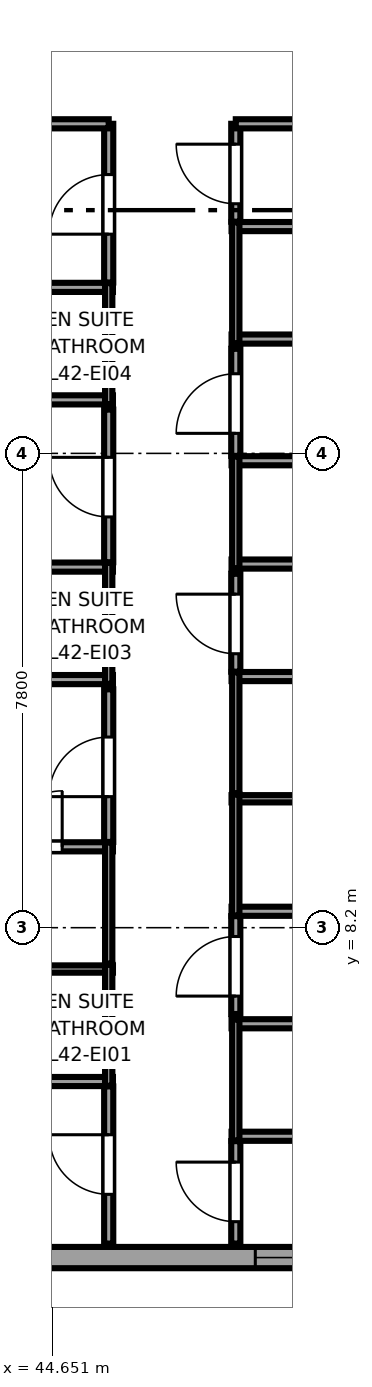
"""IFC4 building model, lengths in metres.
Left out: names, types, materials, properties, quantities, classifications, styles, units other than length and angle.
Written with IfcOpenShell. Run it as: python <this file> out.ifc"""

import sys

from ifc_helpers import new_model, si_unit, direction, frame, frame_2d, origin, place, context, subcontext, project, spatial, rectangle, extrude, source, transform, mapped, element, fill, save


model = new_model("IFC4")
c1 = context("Model", 3, precision=1e-05, world=origin(), true_north=direction((0.0, 1.0)))
c2 = subcontext(c1, "Body", "Model", "MODEL_VIEW")
j1 = project(units=[si_unit("LENGTHUNIT", "METRE"), si_unit("PLANEANGLEUNIT", "RADIAN")], contexts=[c1])
p1 = place(None, origin())
s1 = spatial("IfcSite", under=j1, at=p1, CompositionType="ELEMENT")
p2 = place(p1, origin())
s2 = spatial("IfcBuilding", under=s1, at=p2, CompositionType="ELEMENT")
p3 = place(p2, frame((0.0, 0.0, 161.25)))
s3 = spatial("IfcBuildingStorey", under=s2, at=p3, CompositionType="ELEMENT", Elevation=161.25)
p4 = place(p3, frame((34.375, 2.775, 0.0), z_axis=(0.0, 0.0, 1.0), x_axis=(1.0, 0.0, 0.0)))
e1 = element("IfcWall", 1, at=p4, inside=s3, PredefinedType="SOLIDWALL", context=c2, shape_type="SweptSolid", body=[
    extrude(rectangle(XDim=15.608, YDim=0.35, at=frame_2d((7.804, 0.0))), origin(), (0.0, 0.0, 1.0), 3.37),
])
p5 = place(p4, frame((1.726, 0.0, 0.68)))
e2 = element("IfcOpeningElement", 2, at=p5, cuts=e1, PredefinedType="OPENING", context=c2, shape_type="SweptSolid", body=[
    extrude(rectangle(XDim=2.55, YDim=1.92, at=frame_2d((1.275, 0.96))), frame((0.0, 0.185, 0.0), z_axis=(0.0, -1.0, 0.0), x_axis=(1.0, 0.0, 0.0)), (0.0, 0.0, 1.0), 0.37),
])
p6 = place(p4, frame((13.616, 0.0, 0.62)))
e3 = element("IfcOpeningElement", 3, at=p6, cuts=e1, PredefinedType="OPENING", context=c2, shape_type="SweptSolid", body=[
    extrude(rectangle(XDim=1.5, YDim=1.55, at=frame_2d((0.75, 0.775))), frame((0.0, 0.185, 0.0), z_axis=(0.0, -1.0, 0.0), x_axis=(1.0, 0.0, 0.0)), (0.0, 0.0, 1.0), 0.37),
])
p7 = place(p3, frame((43.06, 5.67, 0.0), z_axis=(0.0, 0.0, 1.0), x_axis=(1.0, 0.0, 0.0)))
e4 = element("IfcWall", 4, at=p7, inside=s3, PredefinedType="PARTITIONING", context=c2, shape_type="SweptSolid", body=[
    extrude(rectangle(XDim=2.59, YDim=0.15, at=frame_2d((1.295, 0.0))), origin(), (0.0, 0.0, 1.0), 3.37),
])
p8 = place(p3, frame((43.06, 7.52, 0.0), z_axis=(0.0, 0.0, 1.0), x_axis=(1.0, 0.0, 0.0)))
e5 = element("IfcWall", 5, at=p8, inside=s3, PredefinedType="PLUMBINGWALL", context=c2, shape_type="SweptSolid", body=[
    extrude(rectangle(XDim=2.59, YDim=0.12, at=frame_2d((1.295, 0.0))), origin(), (0.0, 0.0, 1.0), 3.37),
])
p9 = place(p3, frame((45.58, 5.6, 0.0), z_axis=(0.0, 0.0, 1.0), x_axis=(0.0, 1.0, 0.0)))
e6 = element("IfcWall", 6, at=p9, inside=s3, PredefinedType="PLUMBINGWALL", context=c2, shape_type="SweptSolid", body=[
    extrude(rectangle(XDim=1.99, YDim=0.12, at=frame_2d((0.995, 0.0))), origin(), (0.0, 0.0, 1.0), 3.37),
])
p10 = place(p3, frame((43.06, 9.53, 0.0), z_axis=(0.0, 0.0, 1.0), x_axis=(1.0, 0.0, 0.0)))
e7 = element("IfcWall", 7, at=p10, inside=s3, PredefinedType="PARTITIONING", context=c2, shape_type="SweptSolid", body=[
    extrude(rectangle(XDim=2.59, YDim=0.15, at=frame_2d((1.295, 0.0))), origin(), (0.0, 0.0, 1.0), 3.37),
])
p11 = place(p10, frame((0.835, 0.0, 0.0)))
e8 = element("IfcOpeningElement", 8, at=p11, cuts=e7, PredefinedType="OPENING", context=c2, shape_type="SweptSolid", body=[
    extrude(rectangle(XDim=0.92, YDim=2.01, at=frame_2d((0.46, 1.005))), frame((0.0, 0.085, 0.0), z_axis=(0.0, -1.0, 0.0), x_axis=(1.0, 0.0, 0.0)), (0.0, 0.0, 1.0), 0.17),
])
p12 = place(p3, frame((45.58, 7.61, 0.0), z_axis=(0.0, 0.0, 1.0), x_axis=(0.0, 1.0, 0.0)))
e9 = element("IfcWall", 9, at=p12, inside=s3, PredefinedType="PLUMBINGWALL", context=c2, shape_type="SweptSolid", body=[
    extrude(rectangle(XDim=1.99, YDim=0.12, at=frame_2d((0.995, 0.0))), origin(), (0.0, 0.0, 1.0), 3.001),
])
p13 = place(p3, frame((34.65, 12.28, 0.0), z_axis=(0.0, 0.0, 1.0), x_axis=(1.0, 0.0, 0.0)))
e10 = element("IfcWall", 10, at=p13, inside=s3, PredefinedType="PARTITIONING", context=c2, shape_type="SweptSolid", body=[
    extrude(rectangle(XDim=11.0, YDim=0.15, at=frame_2d((5.5, 0.0))), origin(), (0.0, 0.0, 1.0), 3.37),
])
p14 = place(p3, frame((43.06, 14.13, 0.0), z_axis=(0.0, 0.0, 1.0), x_axis=(1.0, 0.0, 0.0)))
e11 = element("IfcWall", 11, at=p14, inside=s3, PredefinedType="PARTITIONING", context=c2, shape_type="SweptSolid", body=[
    extrude(rectangle(XDim=2.59, YDim=0.15, at=frame_2d((1.295, 0.0))), origin(), (0.0, 0.0, 1.0), 3.37),
])
p15 = place(p3, frame((45.58, 12.21, 0.0), z_axis=(0.0, 0.0, 1.0), x_axis=(0.0, 1.0, 0.0)))
e12 = element("IfcWall", 12, at=p15, inside=s3, PredefinedType="PLUMBINGWALL", context=c2, shape_type="SweptSolid", body=[
    extrude(rectangle(XDim=1.99, YDim=0.12, at=frame_2d((0.995, 0.0))), origin(), (0.0, 0.0, 1.0), 3.001),
])
p16 = place(p3, frame((34.65, 16.88, 0.0), z_axis=(0.0, 0.0, 1.0), x_axis=(1.0, 0.0, 0.0)))
e13 = element("IfcWall", 13, at=p16, inside=s3, PredefinedType="PARTITIONING", context=c2, shape_type="SweptSolid", body=[
    extrude(rectangle(XDim=11.0, YDim=0.15, at=frame_2d((5.5, 0.0))), origin(), (0.0, 0.0, 1.0), 3.37),
])
p17 = place(p3, frame((43.06, 18.73, 0.0), z_axis=(0.0, 0.0, 1.0), x_axis=(1.0, 0.0, 0.0)))
e14 = element("IfcWall", 14, at=p17, inside=s3, PredefinedType="PARTITIONING", context=c2, shape_type="SweptSolid", body=[
    extrude(rectangle(XDim=2.59, YDim=0.15, at=frame_2d((1.295, 0.0))), origin(), (0.0, 0.0, 1.0), 3.37),
])
p18 = place(p3, frame((45.58, 16.81, 0.0), z_axis=(0.0, 0.0, 1.0), x_axis=(0.0, 1.0, 0.0)))
e15 = element("IfcWall", 15, at=p18, inside=s3, PredefinedType="PLUMBINGWALL", context=c2, shape_type="SweptSolid", body=[
    extrude(rectangle(XDim=1.99, YDim=0.12, at=frame_2d((0.995, 0.0))), origin(), (0.0, 0.0, 1.0), 3.001),
])
p19 = place(p3, frame((47.6, 4.77, 0.0), z_axis=(0.0, 0.0, 1.0), x_axis=(1.0, 0.0, 0.0)))
e16 = element("IfcWall", 16, at=p19, inside=s3, PredefinedType="PARTITIONING", context=c2, shape_type="SweptSolid", body=[
    extrude(rectangle(XDim=2.455, YDim=0.15, at=frame_2d((1.228, 0.0))), origin(), (0.0, 0.0, 1.0), 2.832),
])
p20 = place(p3, frame((47.6, 6.62, 0.0), z_axis=(0.0, 0.0, 1.0), x_axis=(1.0, 0.0, 0.0)))
e17 = element("IfcWall", 17, at=p20, inside=s3, PredefinedType="PARTITIONING", context=c2, shape_type="SweptSolid", body=[
    extrude(rectangle(XDim=2.455, YDim=0.15, at=frame_2d((1.228, 0.0))), origin(), (0.0, 0.0, 1.0), 3.37),
])
p21 = place(p3, frame((47.67, 4.7, 0.0), z_axis=(0.0, 0.0, 1.0), x_axis=(0.0, 1.0, 0.0)))
e18 = element("IfcWall", 18, at=p21, inside=s3, PredefinedType="PLUMBINGWALL", context=c2, shape_type="SweptSolid", body=[
    extrude(rectangle(XDim=1.99, YDim=0.12, at=frame_2d((0.995, 0.0))), origin(), (0.0, 0.0, 1.0), 3.37),
])
p22 = place(p3, frame((47.6, 8.47, 0.0), z_axis=(0.0, 0.0, 1.0), x_axis=(1.0, 0.0, 0.0)))
e19 = element("IfcWall", 19, at=p22, inside=s3, PredefinedType="PARTITIONING", context=c2, shape_type="SweptSolid", body=[
    extrude(rectangle(XDim=2.455, YDim=0.15, at=frame_2d((1.228, 0.0))), origin(), (0.0, 0.0, 1.0), 3.37),
])
p23 = place(p3, frame((47.6, 10.32, 0.0), z_axis=(0.0, 0.0, 1.0), x_axis=(1.0, 0.0, 0.0)))
e20 = element("IfcWall", 20, at=p23, inside=s3, PredefinedType="PLUMBINGWALL", context=c2, shape_type="SweptSolid", body=[
    extrude(rectangle(XDim=2.455, YDim=0.12, at=frame_2d((1.228, 0.0))), origin(), (0.0, 0.0, 1.0), 3.37),
])
p24 = place(p3, frame((47.67, 8.4, 0.0), z_axis=(0.0, 0.0, 1.0), x_axis=(0.0, 1.0, 0.0)))
e21 = element("IfcWall", 21, at=p24, inside=s3, PredefinedType="PLUMBINGWALL", context=c2, shape_type="SweptSolid", body=[
    extrude(rectangle(XDim=1.99, YDim=0.12, at=frame_2d((0.995, 0.0))), origin(), (0.0, 0.0, 1.0), 3.37),
])
p25 = place(p3, frame((47.6, 12.33, 0.0), z_axis=(0.0, 0.0, 1.0), x_axis=(1.0, 0.0, 0.0)))
e22 = element("IfcWall", 22, at=p25, inside=s3, PredefinedType="PARTITIONING", context=c2, shape_type="SweptSolid", body=[
    extrude(rectangle(XDim=2.455, YDim=0.15, at=frame_2d((1.228, 0.0))), origin(), (0.0, 0.0, 1.0), 3.37),
])
p26 = place(p3, frame((47.67, 10.41, 0.0), z_axis=(0.0, 0.0, 1.0), x_axis=(0.0, 1.0, 0.0)))
e23 = element("IfcWall", 23, at=p26, inside=s3, PredefinedType="PLUMBINGWALL", context=c2, shape_type="SweptSolid", body=[
    extrude(rectangle(XDim=1.99, YDim=0.12, at=frame_2d((0.995, 0.0))), origin(), (0.0, 0.0, 1.0), 3.37),
])
p27 = place(p3, frame((47.6, 14.18, 0.0), z_axis=(0.0, 0.0, 1.0), x_axis=(1.0, 0.0, 0.0)))
e24 = element("IfcWall", 24, at=p27, inside=s3, PredefinedType="PARTITIONING", context=c2, shape_type="SweptSolid", body=[
    extrude(rectangle(XDim=6.395, YDim=0.15, at=frame_2d((3.198, 0.0))), origin(), (0.0, 0.0, 1.0), 3.37),
])
p28 = place(p3, frame((47.6, 15.879, 0.0), z_axis=(0.0, 0.0, 1.0), x_axis=(1.0, 0.0, 0.0)))
e25 = element("IfcWall", 25, at=p28, inside=s3, PredefinedType="PARTITIONING", context=c2, shape_type="SweptSolid", body=[
    extrude(rectangle(XDim=3.226, YDim=0.15, at=frame_2d((1.613, 0.0))), origin(), (0.0, 0.0, 1.0), 2.758),
])
p29 = place(p3, frame((47.67, 14.11, 0.0), z_axis=(0.0, 0.0, 1.0), x_axis=(0.0, 1.0, 0.0)))
e26 = element("IfcWall", 26, at=p29, inside=s3, PredefinedType="PLUMBINGWALL", context=c2, shape_type="SweptSolid", body=[
    extrude(rectangle(XDim=1.839, YDim=0.12, at=frame_2d((0.919, 0.0))), origin(), (0.0, 0.0, 1.0), 3.37),
])
p30 = place(p3, frame((47.6, 17.88, 0.0), z_axis=(0.0, 0.0, 1.0), x_axis=(1.0, 0.0, 0.0)))
e27 = element("IfcWall", 27, at=p30, inside=s3, PredefinedType="PARTITIONING", context=c2, shape_type="SweptSolid", body=[
    extrude(rectangle(XDim=6.395, YDim=0.15, at=frame_2d((3.198, 0.0))), origin(), (0.0, 0.0, 1.0), 3.37),
])
p31 = place(p3, frame((47.6, 19.73, 0.0), z_axis=(0.0, 0.0, 1.0), x_axis=(1.0, 0.0, 0.0)))
e28 = element("IfcWall", 28, at=p31, inside=s3, PredefinedType="PARTITIONING", context=c2, shape_type="SweptSolid", body=[
    extrude(rectangle(XDim=2.455, YDim=0.15, at=frame_2d((1.228, 0.0))), origin(), (0.0, 0.0, 1.0), 3.37),
])
p32 = place(p3, frame((47.67, 17.81, 0.0), z_axis=(0.0, 0.0, 1.0), x_axis=(0.0, 1.0, 0.0)))
e29 = element("IfcWall", 29, at=p32, inside=s3, PredefinedType="PLUMBINGWALL", context=c2, shape_type="SweptSolid", body=[
    extrude(rectangle(XDim=1.99, YDim=0.12, at=frame_2d((0.995, 0.0))), origin(), (0.0, 0.0, 1.0), 3.37),
])
p33 = place(p3, frame((45.58, 3.005, 0.0), z_axis=(0.0, 0.0, 1.0), x_axis=(0.0, 1.0, 0.0)))
e30 = element("IfcWall", 30, at=p33, inside=s3, PredefinedType="PARTITIONING", context=c2, shape_type="SweptSolid", body=[
    extrude(rectangle(XDim=2.585, YDim=0.15, at=frame_2d((1.292, 0.0))), origin(), (0.0, 0.0, 1.0), 3.37),
])
p34 = place(p33, frame((0.81, 0.0, 0.0)))
e31 = element("IfcOpeningElement", 31, at=p34, cuts=e30, PredefinedType="OPENING", context=c2, shape_type="SweptSolid", body=[
    extrude(rectangle(XDim=0.98, YDim=2.12, at=frame_2d((0.49, 1.06))), frame((0.0, 0.085, 0.0), z_axis=(0.0, -1.0, 0.0), x_axis=(1.0, 0.0, 0.0)), (0.0, 0.0, 1.0), 0.17),
])
p35 = place(p3, frame((45.58, 9.61, 0.0), z_axis=(0.0, 0.0, 1.0), x_axis=(0.0, 1.0, 0.0)))
e32 = element("IfcWall", 32, at=p35, inside=s3, PredefinedType="PARTITIONING", context=c2, shape_type="SweptSolid", body=[
    extrude(rectangle(XDim=2.51, YDim=0.15, at=frame_2d((1.255, 0.0))), origin(), (0.0, 0.0, 1.0), 3.001),
])
p36 = place(p35, frame((0.745, 0.0, 0.0)))
e33 = element("IfcOpeningElement", 33, at=p36, cuts=e32, PredefinedType="OPENING", context=c2, shape_type="SweptSolid", body=[
    extrude(rectangle(XDim=0.98, YDim=2.12, at=frame_2d((0.49, 1.06))), frame((0.0, 0.085, 0.0), z_axis=(0.0, -1.0, 0.0), x_axis=(1.0, 0.0, 0.0)), (0.0, 0.0, 1.0), 0.17),
])
p37 = place(p3, frame((45.58, 14.21, 0.0), z_axis=(0.0, 0.0, 1.0), x_axis=(0.0, 1.0, 0.0)))
e34 = element("IfcWall", 34, at=p37, inside=s3, PredefinedType="PARTITIONING", context=c2, shape_type="SweptSolid", body=[
    extrude(rectangle(XDim=2.51, YDim=0.15, at=frame_2d((1.255, 0.0))), origin(), (0.0, 0.0, 1.0), 3.001),
])
p38 = place(p37, frame((0.745, 0.0, 0.0)))
e35 = element("IfcOpeningElement", 35, at=p38, cuts=e34, PredefinedType="OPENING", context=c2, shape_type="SweptSolid", body=[
    extrude(rectangle(XDim=0.98, YDim=2.12, at=frame_2d((0.49, 1.06))), frame((0.0, 0.085, 0.0), z_axis=(0.0, -1.0, 0.0), x_axis=(1.0, 0.0, 0.0)), (0.0, 0.0, 1.0), 0.17),
])
p39 = place(p3, frame((45.58, 18.81, 0.0), z_axis=(0.0, 0.0, 1.0), x_axis=(0.0, 1.0, 0.0)))
e36 = element("IfcWall", 36, at=p39, inside=s3, PredefinedType="PARTITIONING", context=c2, shape_type="SweptSolid", body=[
    extrude(rectangle(XDim=2.61, YDim=0.15, at=frame_2d((1.305, 0.0))), origin(), (0.0, 0.0, 1.0), 3.001),
])
p40 = place(p39, frame((0.795, 0.0, 0.0)))
e37 = element("IfcOpeningElement", 37, at=p40, cuts=e36, PredefinedType="OPENING", context=c2, shape_type="SweptSolid", body=[
    extrude(rectangle(XDim=0.98, YDim=2.12, at=frame_2d((0.49, 1.06))), frame((0.0, 0.085, 0.0), z_axis=(0.0, -1.0, 0.0), x_axis=(1.0, 0.0, 0.0)), (0.0, 0.0, 1.0), 0.17),
])
p41 = place(p3, frame((34.65, 21.42, 0.0), z_axis=(0.0, 0.0, 1.0), x_axis=(1.0, 0.0, 0.0)))
e38 = element("IfcWall", 38, at=p41, inside=s3, PredefinedType="PARTITIONING", context=c2, shape_type="SweptSolid", body=[
    extrude(rectangle(XDim=10.93, YDim=0.15, at=frame_2d((5.465, 0.0))), origin(), (0.0, 0.0, 1.0), 3.37),
])
p42 = place(p3, frame((47.67, 3.005, 0.0), z_axis=(0.0, 0.0, 1.0), x_axis=(0.0, 1.0, 0.0)))
e39 = element("IfcWall", 39, at=p42, inside=s3, PredefinedType="PARTITIONING", context=c2, shape_type="SweptSolid", body=[
    extrude(rectangle(XDim=1.685, YDim=0.15, at=frame_2d((0.843, 0.0))), origin(), (0.0, 0.0, 1.0), 3.37),
])
p43 = place(p42, frame((0.36, 0.0, 0.0)))
e40 = element("IfcOpeningElement", 40, at=p43, cuts=e39, PredefinedType="OPENING", context=c2, shape_type="SweptSolid", body=[
    extrude(rectangle(XDim=0.98, YDim=2.12, at=frame_2d((0.49, 1.06))), frame((0.0, 0.085, 0.0), z_axis=(0.0, -1.0, 0.0), x_axis=(1.0, 0.0, 0.0)), (0.0, 0.0, 1.0), 0.17),
])
p44 = place(p3, frame((47.67, 6.78, 0.0), z_axis=(0.0, 0.0, 1.0), x_axis=(0.0, 1.0, 0.0)))
e41 = element("IfcWall", 41, at=p44, inside=s3, PredefinedType="PARTITIONING", context=c2, shape_type="SweptSolid", body=[
    extrude(rectangle(XDim=1.61, YDim=0.15, at=frame_2d((0.805, 0.0))), origin(), (0.0, 0.0, 1.0), 3.37),
])
p45 = place(p44, frame((0.295, 0.0, 0.0)))
e42 = element("IfcOpeningElement", 42, at=p45, cuts=e41, PredefinedType="OPENING", context=c2, shape_type="SweptSolid", body=[
    extrude(rectangle(XDim=0.98, YDim=2.12, at=frame_2d((0.49, 1.06))), frame((0.0, 0.085, 0.0), z_axis=(0.0, -1.0, 0.0), x_axis=(1.0, 0.0, 0.0)), (0.0, 0.0, 1.0), 0.17),
])
p46 = place(p3, frame((47.67, 12.41, 0.0), z_axis=(0.0, 0.0, 1.0), x_axis=(0.0, 1.0, 0.0)))
e43 = element("IfcWall", 43, at=p46, inside=s3, PredefinedType="PARTITIONING", context=c2, shape_type="SweptSolid", body=[
    extrude(rectangle(XDim=1.61, YDim=0.15, at=frame_2d((0.805, 0.0))), origin(), (0.0, 0.0, 1.0), 3.37),
])
p47 = place(p46, frame((0.295, 0.0, 0.0)))
e44 = element("IfcOpeningElement", 44, at=p47, cuts=e43, PredefinedType="OPENING", context=c2, shape_type="SweptSolid", body=[
    extrude(rectangle(XDim=0.98, YDim=2.12, at=frame_2d((0.49, 1.06))), frame((0.0, 0.085, 0.0), z_axis=(0.0, -1.0, 0.0), x_axis=(1.0, 0.0, 0.0)), (0.0, 0.0, 1.0), 0.17),
])
p48 = place(p3, frame((47.67, 15.959, 0.0), z_axis=(0.0, 0.0, 1.0), x_axis=(0.0, 1.0, 0.0)))
e45 = element("IfcWall", 45, at=p48, inside=s3, PredefinedType="PARTITIONING", context=c2, shape_type="SweptSolid", body=[
    extrude(rectangle(XDim=1.761, YDim=0.15, at=frame_2d((0.88, 0.0))), origin(), (0.0, 0.0, 1.0), 3.37),
])
p49 = place(p48, frame((0.371, 0.0, 0.0)))
e46 = element("IfcOpeningElement", 46, at=p49, cuts=e45, PredefinedType="OPENING", context=c2, shape_type="SweptSolid", body=[
    extrude(rectangle(XDim=0.98, YDim=2.12, at=frame_2d((0.49, 1.06))), frame((0.0, 0.085, 0.0), z_axis=(0.0, -1.0, 0.0), x_axis=(1.0, 0.0, 0.0)), (0.0, 0.0, 1.0), 0.17),
])
p50 = place(p3, frame((47.67, 19.81, 0.0), z_axis=(0.0, 0.0, 1.0), x_axis=(0.0, 1.0, 0.0)))
e47 = element("IfcWall", 47, at=p50, inside=s3, PredefinedType="PARTITIONING", context=c2, shape_type="SweptSolid", body=[
    extrude(rectangle(XDim=1.61, YDim=0.15, at=frame_2d((0.805, 0.0))), origin(), (0.0, 0.0, 1.0), 3.37),
])
p51 = place(p50, frame((0.295, 0.0, 0.0)))
e48 = element("IfcOpeningElement", 48, at=p51, cuts=e47, PredefinedType="OPENING", context=c2, shape_type="SweptSolid", body=[
    extrude(rectangle(XDim=0.98, YDim=2.12, at=frame_2d((0.49, 1.06))), frame((0.0, 0.085, 0.0), z_axis=(0.0, -1.0, 0.0), x_axis=(1.0, 0.0, 0.0)), (0.0, 0.0, 1.0), 0.17),
])
p52 = place(p3, frame((47.67, 21.42, 0.0), z_axis=(0.0, 0.0, 1.0), x_axis=(1.0, 0.0, 0.0)))
e49 = element("IfcWall", 49, at=p52, inside=s3, PredefinedType="PARTITIONING", context=c2, shape_type="SweptSolid", body=[
    extrude(rectangle(XDim=6.325, YDim=0.15, at=frame_2d((3.163, 0.0))), origin(), (0.0, 0.0, 1.0), 3.37),
])
m1 = source(origin(), c2, "Body", "SweptSolid", [
    extrude(rectangle(XDim=1.5, YDim=1.55, at=frame_2d((0.75, 0.775))), frame((0.0, 0.09, 0.0), z_axis=(0.0, -1.0, 0.0), x_axis=(1.0, 0.0, 0.0)), (0.0, 0.0, 1.0), 0.06),
])
p53 = place(p6, origin())
e50 = element("IfcWindow", 50, at=p53, inside=s3, PartitioningType="SINGLE_PANEL", PredefinedType="WINDOW", context=c2, shape_type="MappedRepresentation", body=[
    mapped(m1, transform((0.0, 0.0, 0.0), x_axis=(1.0, 0.0, 0.0), y_axis=(0.0, 1.0, 0.0), z_axis=(0.0, 0.0, 1.0), scale=1.0)),
])
fill(e3, e50)
m2 = source(origin(), c2, "Body", "SweptSolid", [
    extrude(rectangle(XDim=0.92, YDim=2.01, at=frame_2d((0.46, 1.005))), frame((0.0, 0.025, 0.0), z_axis=(0.0, -1.0, 0.0), x_axis=(1.0, 0.0, 0.0)), (0.0, 0.0, 1.0), 0.05),
])
p54 = place(p11, origin())
e51 = element("IfcDoor", 51, at=p54, inside=s3, OperationType="SINGLE_SWING_RIGHT", PredefinedType="DOOR", context=c2, shape_type="MappedRepresentation", body=[
    mapped(m2, transform((0.0, 0.0, 0.0), x_axis=(1.0, 0.0, 0.0), y_axis=(0.0, 1.0, 0.0), z_axis=(0.0, 0.0, 1.0), scale=1.0)),
])
fill(e8, e51)
m3 = source(origin(), c2, "Body", "SweptSolid", [
    extrude(rectangle(XDim=0.98, YDim=2.12, at=frame_2d((0.49, 1.06))), frame((0.0, 0.025, 0.0), z_axis=(0.0, -1.0, 0.0), x_axis=(1.0, 0.0, 0.0)), (0.0, 0.0, 1.0), 0.05),
])
p55 = place(p34, origin())
e52 = element("IfcDoor", 52, at=p55, inside=s3, OperationType="SINGLE_SWING_RIGHT", PredefinedType="DOOR", context=c2, shape_type="MappedRepresentation", body=[
    mapped(m3, transform((0.0, 0.0, 0.0), x_axis=(1.0, 0.0, 0.0), y_axis=(0.0, 1.0, 0.0), z_axis=(0.0, 0.0, 1.0), scale=1.0)),
])
fill(e31, e52)
p56 = place(p36, origin())
e53 = element("IfcDoor", 53, at=p56, inside=s3, OperationType="SINGLE_SWING_LEFT", PredefinedType="DOOR", context=c2, shape_type="MappedRepresentation", body=[
    mapped(m3, transform((0.0, 0.0, 0.0), x_axis=(1.0, 0.0, 0.0), y_axis=(0.0, 1.0, 0.0), z_axis=(0.0, 0.0, 1.0), scale=1.0)),
])
fill(e33, e53)
p57 = place(p38, origin())
e54 = element("IfcDoor", 54, at=p57, inside=s3, OperationType="SINGLE_SWING_RIGHT", PredefinedType="DOOR", context=c2, shape_type="MappedRepresentation", body=[
    mapped(m3, transform((0.0, 0.0, 0.0), x_axis=(1.0, 0.0, 0.0), y_axis=(0.0, 1.0, 0.0), z_axis=(0.0, 0.0, 1.0), scale=1.0)),
])
fill(e35, e54)
p58 = place(p40, origin())
e55 = element("IfcDoor", 55, at=p58, inside=s3, OperationType="SINGLE_SWING_LEFT", PredefinedType="DOOR", context=c2, shape_type="MappedRepresentation", body=[
    mapped(m3, transform((0.0, 0.0, 0.0), x_axis=(1.0, 0.0, 0.0), y_axis=(0.0, 1.0, 0.0), z_axis=(0.0, 0.0, 1.0), scale=1.0)),
])
fill(e37, e55)
p59 = place(p43, origin())
e56 = element("IfcDoor", 56, at=p59, inside=s3, OperationType="SINGLE_SWING_RIGHT", PredefinedType="DOOR", context=c2, shape_type="MappedRepresentation", body=[
    mapped(m3, transform((0.0, 0.0, 0.0), x_axis=(1.0, 0.0, 0.0), y_axis=(0.0, 1.0, 0.0), z_axis=(0.0, 0.0, 1.0), scale=1.0)),
])
fill(e40, e56)
p60 = place(p45, origin())
e57 = element("IfcDoor", 57, at=p60, inside=s3, OperationType="SINGLE_SWING_LEFT", PredefinedType="DOOR", context=c2, shape_type="MappedRepresentation", body=[
    mapped(m3, transform((0.0, 0.0, 0.0), x_axis=(1.0, 0.0, 0.0), y_axis=(0.0, 1.0, 0.0), z_axis=(0.0, 0.0, 1.0), scale=1.0)),
])
fill(e42, e57)
p61 = place(p47, origin())
e58 = element("IfcDoor", 58, at=p61, inside=s3, OperationType="SINGLE_SWING_RIGHT", PredefinedType="DOOR", context=c2, shape_type="MappedRepresentation", body=[
    mapped(m3, transform((0.0, 0.0, 0.0), x_axis=(1.0, 0.0, 0.0), y_axis=(0.0, 1.0, 0.0), z_axis=(0.0, 0.0, 1.0), scale=1.0)),
])
fill(e44, e58)
p62 = place(p49, origin())
e59 = element("IfcDoor", 59, at=p62, inside=s3, OperationType="SINGLE_SWING_LEFT", PredefinedType="DOOR", context=c2, shape_type="MappedRepresentation", body=[
    mapped(m3, transform((0.0, 0.0, 0.0), x_axis=(1.0, 0.0, 0.0), y_axis=(0.0, 1.0, 0.0), z_axis=(0.0, 0.0, 1.0), scale=1.0)),
])
fill(e46, e59)
p63 = place(p51, origin())
e60 = element("IfcDoor", 60, at=p63, inside=s3, OperationType="SINGLE_SWING_RIGHT", PredefinedType="DOOR", context=c2, shape_type="MappedRepresentation", body=[
    mapped(m3, transform((0.0, 0.0, 0.0), x_axis=(1.0, 0.0, 0.0), y_axis=(0.0, 1.0, 0.0), z_axis=(0.0, 0.0, 1.0), scale=1.0)),
])
fill(e48, e60)
save(model, sys.argv[1])
